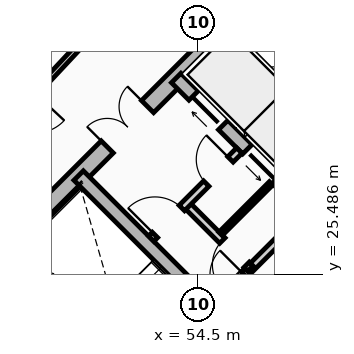
"""IFC4 building model, lengths in metres.
Left out: names, types, materials, properties, quantities, classifications, styles, units other than length and angle.
Written with IfcOpenShell. Run it as: python <this file> out.ifc"""

import sys

from ifc_helpers import new_model, si_unit, direction, frame, frame_2d, origin, place, context, subcontext, project, spatial, rectangle, extrude, source, transform, mapped, element, fill, save


model = new_model("IFC4")
c1 = context("Model", 3, precision=1e-05, world=origin(), true_north=direction((0.0, 1.0)))
c2 = subcontext(c1, "Body", "Model", "MODEL_VIEW")
j1 = project(units=[si_unit("LENGTHUNIT", "METRE"), si_unit("PLANEANGLEUNIT", "RADIAN")], contexts=[c1])
p1 = place(None, origin())
s1 = spatial("IfcSite", under=j1, at=p1, CompositionType="ELEMENT")
p2 = place(p1, origin())
s2 = spatial("IfcBuilding", under=s1, at=p2, CompositionType="ELEMENT")
p3 = place(p2, frame((0.0, 0.0, 75.97)))
s3 = spatial("IfcBuildingStorey", under=s2, at=p3, CompositionType="ELEMENT", Elevation=75.97)
for number, where, z_axis, x_axis in (
    (1, (58.737, 15.697, 0.0), (0.0, 0.0, 1.0), (-0.707, 0.707, 0.0)),
    (2, (66.303, 23.263, 0.0), (0.0, 0.0, 1.0), (-0.707, 0.707, 0.0)),
):
    element("IfcWall", number, at=place(p3, frame(where, z_axis=z_axis, x_axis=x_axis)), inside=s3, PredefinedType="SHEAR", context=c2, shape_type="SweptSolid", body=[
        extrude(rectangle(XDim=14.2, YDim=0.45, at=frame_2d((7.1, 0.0))), origin(), (0.0, 0.0, 1.0), 2.91),
    ])
p4 = place(p3, frame((48.856, 25.578, 0.0), z_axis=(0.0, 0.0, 1.0), x_axis=(0.707106781187, 0.707106781187, 0.0)))
e3 = element("IfcWall", 3, at=p4, inside=s3, PredefinedType="SHEAR", context=c2, shape_type="SweptSolid", body=[
    extrude(rectangle(XDim=10.7, YDim=0.45, at=frame_2d((5.35, 0.0))), origin(), (0.0, 0.0, 1.0), 2.91),
])
m1 = source(origin(), c2, "Body", "SweptSolid", [
    extrude(rectangle(XDim=1.5, YDim=2.02, at=frame_2d((0.75, 1.01))), frame((0.0, 0.235, 0.0), z_axis=(0.0, -1.0, 0.0), x_axis=(1.0, 0.0, 0.0)), (0.0, 0.0, 1.0), 0.47),
])
p5 = place(p4, frame((4.6, 0.0, 0.0)))
e4 = element("IfcOpeningElement", 4, at=p5, cuts=e3, PredefinedType="OPENING", context=c2, shape_type="MappedRepresentation", body=[
    mapped(m1, transform((0.0, 0.0, 0.0), x_axis=(1.0, 0.0, 0.0), y_axis=(0.0, 1.0, 0.0), z_axis=(0.0, 0.0, 1.0), scale=1.0)),
])
p6 = place(p3, frame((61.078, 18.355, 0.0), z_axis=(0.0, 0.0, 1.0), x_axis=(-0.707106781187, 0.707106781187, 0.0)))
e5 = element("IfcWall", 5, at=p6, inside=s3, PredefinedType="SHEAR", context=c2, shape_type="SweptSolid", body=[
    extrude(rectangle(XDim=13.75, YDim=0.35, at=frame_2d((6.875, 0.0))), origin(), (0.0, 0.0, 1.0), 2.91),
])
m2 = source(origin(), c2, "Body", "SweptSolid", [
    extrude(rectangle(XDim=1.1, YDim=2.015, at=frame_2d((0.55, 1.007))), frame((0.0, 0.185, 0.0), z_axis=(0.0, -1.0, 0.0), x_axis=(1.0, 0.0, 0.0)), (0.0, 0.0, 1.0), 0.37),
])
p7 = place(p6, frame((4.875, 0.0, 0.0)))
e6 = element("IfcOpeningElement", 6, at=p7, cuts=e5, PredefinedType="OPENING", context=c2, shape_type="MappedRepresentation", body=[
    mapped(m2, transform((0.0, 0.0, 0.0), x_axis=(1.0, 0.0, 0.0), y_axis=(0.0, 1.0, 0.0), z_axis=(0.0, 0.0, 1.0), scale=1.0)),
])
m3 = source(origin(), c2, "Body", "SweptSolid", [
    extrude(rectangle(XDim=1.15, YDim=2.02, at=frame_2d((0.575, 1.01))), frame((0.0, 0.185, 0.0), z_axis=(0.0, -1.0, 0.0), x_axis=(1.0, 0.0, 0.0)), (0.0, 0.0, 1.0), 0.37),
])
p8 = place(p6, frame((7.295, 0.0, 0.0)))
e7 = element("IfcOpeningElement", 7, at=p8, cuts=e5, PredefinedType="OPENING", context=c2, shape_type="MappedRepresentation", body=[
    mapped(m3, transform((0.0, 0.0, 0.0), x_axis=(1.0, 0.0, 0.0), y_axis=(0.0, 1.0, 0.0), z_axis=(0.0, 0.0, 1.0), scale=1.0)),
])
p9 = place(p3, frame((63.645, 20.922, 0.0), z_axis=(0.0, 0.0, 1.0), x_axis=(-0.707106781187, 0.707106781187, 0.0)))
e8 = element("IfcWall", 8, at=p9, inside=s3, PredefinedType="SHEAR", context=c2, shape_type="SweptSolid", body=[
    extrude(rectangle(XDim=13.75, YDim=0.35, at=frame_2d((6.875, 0.0))), origin(), (0.0, 0.0, 1.0), 2.91),
])
p10 = place(p9, frame((10.0, 0.0, 0.0)))
e9 = element("IfcOpeningElement", 9, at=p10, cuts=e8, PredefinedType="OPENING", context=c2, shape_type="MappedRepresentation", body=[
    mapped(m2, transform((0.0, 0.0, 0.0), x_axis=(1.0, 0.0, 0.0), y_axis=(0.0, 1.0, 0.0), z_axis=(0.0, 0.0, 1.0), scale=1.0)),
])
p11 = place(p9, frame((12.0, 0.0, 0.0)))
e10 = element("IfcOpeningElement", 10, at=p11, cuts=e8, PredefinedType="OPENING", context=c2, shape_type="MappedRepresentation", body=[
    mapped(m2, transform((0.0, 0.0, 0.0), x_axis=(1.0, 0.0, 0.0), y_axis=(0.0, 1.0, 0.0), z_axis=(0.0, 0.0, 1.0), scale=1.0)),
])
p12 = place(p9, frame((5.305, 0.0, 0.0)))
e11 = element("IfcOpeningElement", 11, at=p12, cuts=e8, PredefinedType="OPENING", context=c2, shape_type="MappedRepresentation", body=[
    mapped(m3, transform((0.0, 0.0, 0.0), x_axis=(1.0, 0.0, 0.0), y_axis=(0.0, 1.0, 0.0), z_axis=(0.0, 0.0, 1.0), scale=1.0)),
])
p13 = place(p3, frame((53.922, 21.141, 0.0), z_axis=(0.0, 0.0, 1.0), x_axis=(-0.707088616009, 0.707124945897, 0.0)))
e12 = element("IfcWall", 12, at=p13, inside=s3, PredefinedType="SHEAR", context=c2, shape_type="SweptSolid", body=[
    extrude(rectangle(XDim=6.72, YDim=0.35, at=frame_2d((3.36, 0.0))), origin(), (0.0, 0.0, 1.0), 2.91),
])
p14 = place(p3, frame((55.615, 29.227, 0.0), z_axis=(0.0, 0.0, 1.0), x_axis=(0.707147878904, 0.70706568108, 0.0)))
e13 = element("IfcWall", 13, at=p14, inside=s3, PredefinedType="SHEAR", context=c2, shape_type="SweptSolid", body=[
    extrude(rectangle(XDim=2.97, YDim=0.2, at=frame_2d((1.485, 0.0))), origin(), (0.0, 0.0, 1.0), 2.91),
])
p15 = place(p3, frame((57.419, 31.2, 0.0), z_axis=(0.0, 0.0, 1.0), x_axis=(-0.707032117043, 0.707181437447, 0.0)))
e14 = element("IfcWall", 14, at=p15, inside=s3, PredefinedType="SHEAR", context=c2, shape_type="SweptSolid", body=[
    extrude(rectangle(XDim=1.635, YDim=0.2, at=frame_2d((0.817, 0.0))), origin(), (0.0, 0.0, 1.0), 2.91),
])
p16 = place(p3, frame((54.961, 24.719, 0.0), z_axis=(0.0, 0.0, 1.0), x_axis=(0.707106781187, 0.707106781187, 0.0)))
e15 = element("IfcWall", 15, at=p16, inside=s3, PredefinedType="PARTITIONING", context=c2, shape_type="SweptSolid", body=[
    extrude(rectangle(XDim=3.28, YDim=0.2, at=frame_2d((1.64, 0.0))), origin(), (0.0, 0.0, 1.0), 2.655),
])
m4 = source(origin(), c2, "Body", "SweptSolid", [
    extrude(rectangle(XDim=0.9, YDim=2.005, at=frame_2d((0.45, 1.002))), frame((0.0, 0.11, 0.0), z_axis=(0.0, -1.0, 0.0), x_axis=(1.0, 0.0, 0.0)), (0.0, 0.0, 1.0), 0.22),
])
p17 = place(p16, frame((0.16, 0.0, 0.0)))
e16 = element("IfcOpeningElement", 16, at=p17, cuts=e15, PredefinedType="OPENING", context=c2, shape_type="MappedRepresentation", body=[
    mapped(m4, transform((0.0, 0.0, 0.0), x_axis=(1.0, 0.0, 0.0), y_axis=(0.0, 1.0, 0.0), z_axis=(0.0, 0.0, 1.0), scale=1.0)),
])
p18 = place(p3, frame((55.874, 25.631, 0.0), z_axis=(0.0, 0.0, 1.0), x_axis=(-0.707157639372, 0.707055919343, 0.0)))
e17 = element("IfcWall", 17, at=p18, inside=s3, PredefinedType="PARTITIONING", context=c2, shape_type="SweptSolid", body=[
    extrude(rectangle(XDim=2.4, YDim=0.2, at=frame_2d((1.2, 0.0))), origin(), (0.0, 0.0, 1.0), 2.655),
])
p19 = place(p18, frame((0.14, 0.0, 0.0)))
e18 = element("IfcOpeningElement", 18, at=p19, cuts=e17, PredefinedType="OPENING", context=c2, shape_type="MappedRepresentation", body=[
    mapped(m4, transform((0.0, 0.0, 0.0), x_axis=(1.0, 0.0, 0.0), y_axis=(0.0, 1.0, 0.0), z_axis=(0.0, 0.0, 1.0), scale=1.0)),
])
p20 = place(p3, frame((53.264, 26.416, 0.0), z_axis=(0.0, 0.0, 1.0), x_axis=(0.707106781187, 0.707106781187, 0.0)))
e19 = element("IfcWall", 19, at=p20, inside=s3, PredefinedType="PARTITIONING", context=c2, shape_type="SweptSolid", body=[
    extrude(rectangle(XDim=3.28, YDim=0.2, at=frame_2d((1.64, 0.0))), origin(), (0.0, 0.0, 1.0), 2.655),
])
m5 = source(origin(), c2, "Body", "SweptSolid", [
    extrude(rectangle(XDim=1.0, YDim=2.015, at=frame_2d((0.5, 1.007))), frame((0.0, 0.11, 0.0), z_axis=(0.0, -1.0, 0.0), x_axis=(1.0, 0.0, 0.0)), (0.0, 0.0, 1.0), 0.22),
])
p21 = place(p20, frame((0.14, 0.0, 0.0)))
e20 = element("IfcOpeningElement", 20, at=p21, cuts=e19, PredefinedType="OPENING", context=c2, shape_type="MappedRepresentation", body=[
    mapped(m5, transform((0.0, 0.0, 0.0), x_axis=(1.0, 0.0, 0.0), y_axis=(0.0, 1.0, 0.0), z_axis=(0.0, 0.0, 1.0), scale=1.0)),
])
p22 = place(p20, frame((2.05, 0.0, 0.0)))
e21 = element("IfcOpeningElement", 21, at=p22, cuts=e19, PredefinedType="OPENING", context=c2, shape_type="MappedRepresentation", body=[
    mapped(m4, transform((0.0, 0.0, 0.0), x_axis=(1.0, 0.0, 0.0), y_axis=(0.0, 1.0, 0.0), z_axis=(0.0, 0.0, 1.0), scale=1.0)),
])
p23 = place(p3, frame((55.089, 26.543, 0.0), z_axis=(0.0, 0.0, 1.0), x_axis=(0.707106781187, 0.707106781187, 0.0)))
e22 = element("IfcWall", 22, at=p23, inside=s3, PredefinedType="PARTITIONING", context=c2, shape_type="SweptSolid", body=[
    extrude(rectangle(XDim=1.88, YDim=0.125, at=frame_2d((0.94, 0.0))), origin(), (0.0, 0.0, 1.0), 2.655),
])
p24 = place(p3, frame((52.079, 32.244, 0.0), z_axis=(0.0, 0.0, 1.0), x_axis=(-0.682703325574, -0.730695674854, 0.0)))
e23 = element("IfcWall", 23, at=p24, inside=s3, PredefinedType="PARTITIONING", context=c2, shape_type="SweptSolid", body=[
    extrude(rectangle(XDim=6.527, YDim=0.15, at=frame_2d((3.263, 0.0))), origin(), (0.0, 0.0, 1.0), 2.225),
])
m6 = source(origin(), c2, "Body", "SweptSolid", [
    extrude(rectangle(XDim=1.05, YDim=2.015, at=frame_2d((0.525, 1.007))), frame((0.0, 0.085, 0.0), z_axis=(0.0, -1.0, 0.0), x_axis=(1.0, 0.0, 0.0)), (0.0, 0.0, 1.0), 0.17),
])
p25 = place(p24, frame((2.738, 0.0, 0.0)))
e24 = element("IfcOpeningElement", 24, at=p25, cuts=e23, PredefinedType="OPENING", context=c2, shape_type="MappedRepresentation", body=[
    mapped(m6, transform((0.0, 0.0, 0.0), x_axis=(1.0, 0.0, 0.0), y_axis=(0.0, 1.0, 0.0), z_axis=(0.0, 0.0, 1.0), scale=1.0)),
])
m7 = source(origin(), c2, "Body", "SweptSolid", [
    extrude(rectangle(XDim=1.1, YDim=2.015, at=frame_2d((0.55, 1.007))), frame((0.0, 0.025, 0.0), z_axis=(0.0, -1.0, 0.0), x_axis=(1.0, 0.0, 0.0)), (0.0, 0.0, 1.0), 0.05),
])
p26 = place(p10, origin())
e25 = element("IfcDoor", 25, at=p26, inside=s3, OperationType="SLIDING_TO_LEFT", PredefinedType="DOOR", context=c2, shape_type="MappedRepresentation", body=[
    mapped(m7, transform((0.0, 0.0, 0.0), x_axis=(1.0, 0.0, 0.0), y_axis=(0.0, 1.0, 0.0), z_axis=(0.0, 0.0, 1.0), scale=1.0)),
])
fill(e9, e25)
p27 = place(p11, origin())
e26 = element("IfcDoor", 26, at=p27, inside=s3, OperationType="SLIDING_TO_RIGHT", PredefinedType="DOOR", context=c2, shape_type="MappedRepresentation", body=[
    mapped(m7, transform((0.0, 0.0, 0.0), x_axis=(1.0, 0.0, 0.0), y_axis=(0.0, 1.0, 0.0), z_axis=(0.0, 0.0, 1.0), scale=1.0)),
])
fill(e10, e26)
m8 = source(origin(), c2, "Body", "SweptSolid", [
    extrude(rectangle(XDim=1.5, YDim=2.02, at=frame_2d((0.75, 1.01))), frame((0.0, 0.025, 0.0), z_axis=(0.0, -1.0, 0.0), x_axis=(1.0, 0.0, 0.0)), (0.0, 0.0, 1.0), 0.05),
])
p28 = place(p5, origin())
e27 = element("IfcDoor", 27, at=p28, inside=s3, OperationType="DOUBLE_DOOR_SINGLE_SWING", PredefinedType="DOOR", context=c2, shape_type="MappedRepresentation", body=[
    mapped(m8, transform((0.0, 0.0, 0.0), x_axis=(1.0, 0.0, 0.0), y_axis=(0.0, 1.0, 0.0), z_axis=(0.0, 0.0, 1.0), scale=1.0)),
])
fill(e4, e27)
m9 = source(origin(), c2, "Body", "SweptSolid", [
    extrude(rectangle(XDim=0.9, YDim=2.005, at=frame_2d((0.45, 1.002))), frame((0.0, 0.025, 0.0), z_axis=(0.0, -1.0, 0.0), x_axis=(1.0, 0.0, 0.0)), (0.0, 0.0, 1.0), 0.05),
])
p29 = place(p17, origin())
e28 = element("IfcDoor", 28, at=p29, inside=s3, OperationType="SINGLE_SWING_RIGHT", PredefinedType="DOOR", context=c2, shape_type="MappedRepresentation", body=[
    mapped(m9, transform((0.0, 0.0, 0.0), x_axis=(1.0, 0.0, 0.0), y_axis=(0.0, 1.0, 0.0), z_axis=(0.0, 0.0, 1.0), scale=1.0)),
])
fill(e16, e28)
m10 = source(origin(), c2, "Body", "SweptSolid", [
    extrude(rectangle(XDim=1.0, YDim=2.015, at=frame_2d((0.5, 1.007))), frame((0.0, 0.025, 0.0), z_axis=(0.0, -1.0, 0.0), x_axis=(1.0, 0.0, 0.0)), (0.0, 0.0, 1.0), 0.05),
])
p30 = place(p21, origin())
e29 = element("IfcDoor", 29, at=p30, inside=s3, OperationType="SINGLE_SWING_LEFT", PredefinedType="DOOR", context=c2, shape_type="MappedRepresentation", body=[
    mapped(m10, transform((0.0, 0.0, 0.0), x_axis=(1.0, 0.0, 0.0), y_axis=(0.0, 1.0, 0.0), z_axis=(0.0, 0.0, 1.0), scale=1.0)),
])
fill(e20, e29)
p31 = place(p19, origin())
e30 = element("IfcDoor", 30, at=p31, inside=s3, OperationType="SINGLE_SWING_LEFT", PredefinedType="DOOR", context=c2, shape_type="MappedRepresentation", body=[
    mapped(m9, transform((0.0, 0.0, 0.0), x_axis=(1.0, 0.0, 0.0), y_axis=(0.0, 1.0, 0.0), z_axis=(0.0, 0.0, 1.0), scale=1.0)),
])
fill(e18, e30)
p32 = place(p22, origin())
e31 = element("IfcDoor", 31, at=p32, inside=s3, OperationType="SINGLE_SWING_RIGHT", PredefinedType="DOOR", context=c2, shape_type="MappedRepresentation", body=[
    mapped(m9, transform((0.0, 0.0, 0.0), x_axis=(1.0, 0.0, 0.0), y_axis=(0.0, 1.0, 0.0), z_axis=(0.0, 0.0, 1.0), scale=1.0)),
])
fill(e21, e31)
save(model, sys.argv[1])
